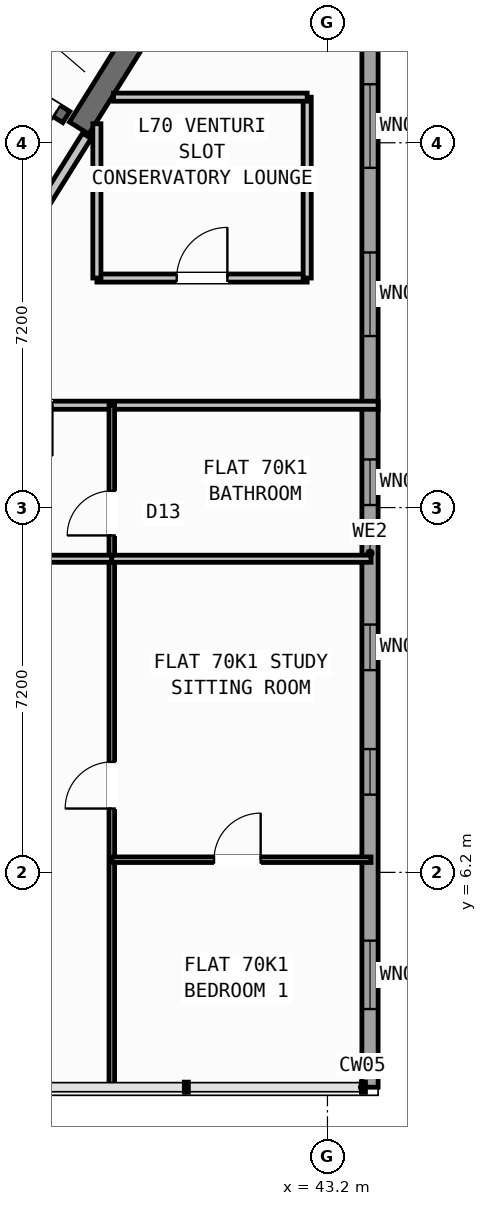
"""IFC4 building model, lengths in metres.
Left out: names, types, materials, properties, quantities, classifications, styles, units other than length and angle.
Written with IfcOpenShell. Run it as: python <this file> out.ifc"""

import sys

from ifc_helpers import new_model, si_unit, direction, frame, frame_2d, origin, place, context, subcontext, project, spatial, rectangle, extrude, source, transform, mapped, element, fill, save


model = new_model("IFC4")
c1 = context("Model", 3, precision=1e-05, world=origin(), true_north=direction((0.0, 1.0)))
c2 = subcontext(c1, "Body", "Model", "MODEL_VIEW")
j1 = project(units=[si_unit("LENGTHUNIT", "METRE"), si_unit("PLANEANGLEUNIT", "RADIAN")], contexts=[c1])
p1 = place(None, origin())
s1 = spatial("IfcSite", under=j1, at=p1, CompositionType="ELEMENT")
p2 = place(p1, origin())
s2 = spatial("IfcBuilding", under=s1, at=p2, CompositionType="ELEMENT")
p3 = place(p2, frame((0.0, 0.0, 277.2)))
s3 = spatial("IfcBuildingStorey", under=s2, at=p3, CompositionType="ELEMENT", Elevation=277.2)
p4 = place(p3, frame((40.221, 23.965, 0.0), z_axis=(0.0, 0.0, 1.0), x_axis=(-0.529902075036, -0.848058836916, 0.0)))
e1 = element("IfcWall", 1, at=p4, inside=s3, PredefinedType="SHEAR", context=c2, shape_type="SweptSolid", body=[
    extrude(rectangle(XDim=3.625, YDim=0.45, at=frame_2d((1.812, 0.0))), origin(), (0.0, 0.0, 1.0), 3.35),
])
p5 = place(p3, frame((44.04, 23.04, 0.0), z_axis=(0.0, 0.0, 1.0), x_axis=(0.0, -1.0, 0.0)))
e2 = element("IfcWall", 2, at=p5, inside=s3, PredefinedType="STANDARD", context=c2, shape_type="SweptSolid", body=[
    extrude(rectangle(XDim=21.08, YDim=0.32, at=frame_2d((10.54, 0.0))), origin(), (0.0, 0.0, 1.0), 3.35),
])
p6 = place(p5, frame((1.285, 0.0, 0.9)))
e3 = element("IfcOpeningElement", 3, at=p6, cuts=e2, PredefinedType="OPENING", context=c2, shape_type="SweptSolid", body=[
    extrude(rectangle(XDim=1.65, YDim=1.45, at=frame_2d((0.825, 0.725))), frame((0.0, 0.17, 0.0), z_axis=(0.0, -1.0, 0.0), x_axis=(1.0, 0.0, 0.0)), (0.0, 0.0, 1.0), 0.34),
])
p7 = place(p5, frame((4.605, 0.0, 0.9)))
e4 = element("IfcOpeningElement", 4, at=p7, cuts=e2, PredefinedType="OPENING", context=c2, shape_type="SweptSolid", body=[
    extrude(rectangle(XDim=1.65, YDim=1.45, at=frame_2d((0.825, 0.725))), frame((0.0, 0.17, 0.0), z_axis=(0.0, -1.0, 0.0), x_axis=(1.0, 0.0, 0.0)), (0.0, 0.0, 1.0), 0.34),
])
p8 = place(p5, frame((8.69, 0.0, 1.0)))
e5 = element("IfcOpeningElement", 5, at=p8, cuts=e2, PredefinedType="OPENING", context=c2, shape_type="SweptSolid", body=[
    extrude(rectangle(XDim=0.9, YDim=1.25, at=frame_2d((0.45, 0.625))), frame((0.0, 0.17, 0.0), z_axis=(0.0, -1.0, 0.0), x_axis=(1.0, 0.0, 0.0)), (0.0, 0.0, 1.0), 0.34),
])
p9 = place(p5, frame((11.949, 0.0, 1.0)))
e6 = element("IfcOpeningElement", 6, at=p9, cuts=e2, PredefinedType="OPENING", context=c2, shape_type="SweptSolid", body=[
    extrude(rectangle(XDim=0.9, YDim=1.25, at=frame_2d((0.45, 0.625))), frame((0.0, 0.17, 0.0), z_axis=(0.0, -1.0, 0.0), x_axis=(1.0, 0.0, 0.0)), (0.0, 0.0, 1.0), 0.34),
])
p10 = place(p5, frame((14.406, 0.0, 1.0)))
e7 = element("IfcOpeningElement", 7, at=p10, cuts=e2, PredefinedType="OPENING", context=c2, shape_type="SweptSolid", body=[
    extrude(rectangle(XDim=0.9, YDim=1.25, at=frame_2d((0.45, 0.625))), frame((0.0, 0.17, 0.0), z_axis=(0.0, -1.0, 0.0), x_axis=(1.0, 0.0, 0.0)), (0.0, 0.0, 1.0), 0.34),
])
p11 = place(p5, frame((18.188, 0.0, 0.9)))
e8 = element("IfcOpeningElement", 8, at=p11, cuts=e2, PredefinedType="OPENING", context=c2, shape_type="SweptSolid", body=[
    extrude(rectangle(XDim=1.35, YDim=1.45, at=frame_2d((0.675, 0.725))), frame((0.0, 0.17, 0.0), z_axis=(0.0, -1.0, 0.0), x_axis=(1.0, 0.0, 0.0)), (0.0, 0.0, 1.0), 0.34),
])
p12 = place(p3, frame((38.046, 21.108, 0.0), z_axis=(0.0, 0.0, 1.0), x_axis=(-0.848054434086, 0.529909121291, 0.0)))
e9 = element("IfcWall", 9, at=p12, inside=s3, PredefinedType="SHEAR", context=c2, shape_type="SweptSolid", body=[
    extrude(rectangle(XDim=7.33, YDim=0.26, at=frame_2d((3.665, 0.0))), origin(), (0.0, 0.0, 1.0), 3.35),
])
p13 = place(p12, frame((0.22, 0.0, 0.0)))
e10 = element("IfcOpeningElement", 10, at=p13, cuts=e9, PredefinedType="OPENING", context=c2, shape_type="SweptSolid", body=[
    extrude(rectangle(XDim=1.1, YDim=2.1, at=frame_2d((0.55, 1.05))), frame((0.0, 0.14, 0.0), z_axis=(0.0, -1.0, 0.0), x_axis=(1.0, 0.0, 0.0)), (0.0, 0.0, 1.0), 0.28),
])
p14 = place(p3, frame((38.451, 20.737, 0.0), z_axis=(0.0, 0.0, 1.0), x_axis=(-0.529924799939, -0.848044637038, 0.0)))
e11 = element("IfcWall", 11, at=p14, inside=s3, PredefinedType="STANDARD", context=c2, shape_type="SweptSolid", body=[
    extrude(rectangle(XDim=2.96, YDim=0.2, at=frame_2d((1.48, 0.0))), origin(), (0.0, 0.0, 1.0), 3.34),
])
p15 = place(p14, frame((1.46, 0.0, 0.0)))
e12 = element("IfcOpeningElement", 12, at=p15, cuts=e11, PredefinedType="OPENING", context=c2, shape_type="SweptSolid", body=[
    extrude(rectangle(XDim=0.86, YDim=2.05, at=frame_2d((0.43, 1.025))), frame((0.0, 0.11, 0.0), z_axis=(0.0, -1.0, 0.0), x_axis=(1.0, 0.0, 0.0)), (0.0, 0.0, 1.0), 0.22),
])
p16 = place(p3, frame((35.178, 15.42, 0.0), z_axis=(0.0, 0.0, 1.0), x_axis=(1.0, 0.0, 0.0)))
e13 = element("IfcWall", 13, at=p16, inside=s3, PredefinedType="PARTITIONING", context=c2, shape_type="SweptSolid", body=[
    extrude(rectangle(XDim=9.021, YDim=0.16, at=frame_2d((4.511, 0.0))), origin(), (0.0, 0.0, 1.0), 3.34),
])
p17 = place(p16, frame((1.594, 0.0, 0.0)))
e14 = element("IfcOpeningElement", 14, at=p17, cuts=e13, PredefinedType="OPENING", context=c2, shape_type="SweptSolid", body=[
    extrude(rectangle(XDim=1.0, YDim=2.1, at=frame_2d((0.5, 1.05))), frame((0.0, 0.09, 0.0), z_axis=(0.0, -1.0, 0.0), x_axis=(1.0, 0.0, 0.0)), (0.0, 0.0, 1.0), 0.18),
])
p18 = place(p3, frame((38.65, 17.93, 0.0), z_axis=(0.0, 0.0, 1.0), x_axis=(1.0, 0.0, 0.0)))
e15 = element("IfcWall", 15, at=p18, inside=s3, PredefinedType="PARTITIONING", context=c2, shape_type="SweptSolid", body=[
    extrude(rectangle(XDim=4.15, YDim=0.16, at=frame_2d((2.075, 0.0))), origin(), (0.0, 0.0, 1.0), 3.34),
])
p19 = place(p18, frame((1.575, 0.0, 0.0)))
e16 = element("IfcOpeningElement", 16, at=p19, cuts=e15, PredefinedType="OPENING", context=c2, shape_type="SweptSolid", body=[
    extrude(rectangle(XDim=1.0, YDim=2.1, at=frame_2d((0.5, 1.05))), frame((0.0, 0.09, 0.0), z_axis=(0.0, -1.0, 0.0), x_axis=(1.0, 0.0, 0.0)), (0.0, 0.0, 1.0), 0.18),
])
p20 = place(p3, frame((38.65, 17.93, 0.0), z_axis=(0.0, 0.0, 1.0), x_axis=(0.0, 1.0, 0.0)))
e17 = element("IfcWall", 17, at=p20, inside=s3, PredefinedType="PARTITIONING", context=c2, shape_type="SweptSolid", body=[
    extrude(rectangle(XDim=3.046, YDim=0.16, at=frame_2d((1.523, 0.0))), origin(), (0.0, 0.0, 1.0), 3.34),
])
p21 = place(p3, frame((42.8, 17.93, 0.0), z_axis=(0.0, 0.0, 1.0), x_axis=(0.0, 1.0, 0.0)))
e18 = element("IfcWall", 18, at=p21, inside=s3, PredefinedType="PARTITIONING", context=c2, shape_type="SweptSolid", body=[
    extrude(rectangle(XDim=3.57, YDim=0.16, at=frame_2d((1.785, 0.0))), origin(), (0.0, 0.0, 1.0), 3.34),
])
p22 = place(p3, frame((38.978, 21.5, 0.0), z_axis=(0.0, 0.0, 1.0), x_axis=(1.0, 0.0, 0.0)))
e19 = element("IfcWall", 19, at=p22, inside=s3, PredefinedType="PARTITIONING", context=c2, shape_type="SweptSolid", body=[
    extrude(rectangle(XDim=3.823, YDim=0.16, at=frame_2d((1.911, 0.0))), origin(), (0.0, 0.0, 1.0), 3.34),
])
p23 = place(p3, frame((38.944, 1.96, 0.0), z_axis=(0.0, 0.0, 1.0), x_axis=(0.0, 1.0, 0.0)))
e20 = element("IfcWall", 20, at=p23, inside=s3, PredefinedType="PARTITIONING", context=c2, shape_type="SweptSolid", body=[
    extrude(rectangle(XDim=13.46, YDim=0.11, at=frame_2d((6.73, 0.0))), origin(), (0.0, 0.0, 1.0), 3.34),
])
p24 = place(p23, frame((5.5, 0.0, 0.0)))
e21 = element("IfcOpeningElement", 21, at=p24, cuts=e20, PredefinedType="OPENING", context=c2, shape_type="SweptSolid", body=[
    extrude(rectangle(XDim=0.92, YDim=2.08, at=frame_2d((0.46, 1.04))), frame((0.0, 0.065, 0.0), z_axis=(0.0, -1.0, 0.0), x_axis=(1.0, 0.0, 0.0)), (0.0, 0.0, 1.0), 0.13),
])
p25 = place(p23, frame((10.89, 0.0, 0.0)))
e22 = element("IfcOpeningElement", 22, at=p25, cuts=e20, PredefinedType="OPENING", context=c2, shape_type="SweptSolid", body=[
    extrude(rectangle(XDim=0.88, YDim=2.08, at=frame_2d((0.44, 1.04))), frame((0.0, 0.065, 0.0), z_axis=(0.0, -1.0, 0.0), x_axis=(1.0, 0.0, 0.0)), (0.0, 0.0, 1.0), 0.13),
])
p26 = place(p3, frame((33.267, 12.39, 0.0), z_axis=(0.0, 0.0, 1.0), x_axis=(1.0, 0.0, 0.0)))
e23 = element("IfcWall", 23, at=p26, inside=s3, PredefinedType="PLUMBINGWALL", context=c2, shape_type="SweptSolid", body=[
    extrude(rectangle(XDim=5.677, YDim=0.14, at=frame_2d((2.838, 0.0))), origin(), (0.0, 0.0, 1.0), 3.34),
])
p27 = place(p26, frame((1.795, 0.0, 0.0)))
e24 = element("IfcOpeningElement", 24, at=p27, cuts=e23, PredefinedType="OPENING", context=c2, shape_type="SweptSolid", body=[
    extrude(rectangle(XDim=0.92, YDim=2.08, at=frame_2d((0.46, 1.04))), frame((0.0, 0.08, 0.0), z_axis=(0.0, -1.0, 0.0), x_axis=(1.0, 0.0, 0.0)), (0.0, 0.0, 1.0), 0.16),
])
p28 = place(p3, frame((38.944, 12.39, 0.0), z_axis=(0.0, 0.0, 1.0), x_axis=(1.0, 0.0, 0.0)))
e25 = element("IfcWall", 25, at=p28, inside=s3, PredefinedType="PLUMBINGWALL", context=c2, shape_type="SweptSolid", body=[
    extrude(rectangle(XDim=5.116, YDim=0.14, at=frame_2d((2.558, 0.0))), origin(), (0.0, 0.0, 1.0), 3.34),
])
p29 = place(p3, frame((38.944, 6.45, 0.0), z_axis=(0.0, 0.0, 1.0), x_axis=(1.0, 0.0, 0.0)))
e26 = element("IfcWall", 26, at=p29, inside=s3, PredefinedType="PARTITIONING", context=c2, shape_type="SweptSolid", body=[
    extrude(rectangle(XDim=5.116, YDim=0.11, at=frame_2d((2.558, 0.0))), origin(), (0.0, 0.0, 1.0), 3.34),
])
p30 = place(p29, frame((2.018, 0.0, 0.0)))
e27 = element("IfcOpeningElement", 27, at=p30, cuts=e26, PredefinedType="OPENING", context=c2, shape_type="SweptSolid", body=[
    extrude(rectangle(XDim=0.92, YDim=2.08, at=frame_2d((0.46, 1.04))), frame((0.0, 0.065, 0.0), z_axis=(0.0, -1.0, 0.0), x_axis=(1.0, 0.0, 0.0)), (0.0, 0.0, 1.0), 0.13),
])
m1 = source(origin(), c2, "Body", "SweptSolid", [
    extrude(rectangle(XDim=1.65, YDim=1.45, at=frame_2d((0.825, 0.725))), frame((0.0, 0.03, 0.0), z_axis=(0.0, -1.0, 0.0), x_axis=(1.0, 0.0, 0.0)), (0.0, 0.0, 1.0), 0.06),
])
p31 = place(p6, origin())
e28 = element("IfcWindow", 28, at=p31, inside=s3, PartitioningType="SINGLE_PANEL", PredefinedType="WINDOW", context=c2, shape_type="MappedRepresentation", body=[
    mapped(m1, transform((0.0, 0.0, 0.0), scale=1.0)),
])
fill(e3, e28)
p32 = place(p7, origin())
e29 = element("IfcWindow", 29, at=p32, inside=s3, PartitioningType="SINGLE_PANEL", PredefinedType="WINDOW", context=c2, shape_type="MappedRepresentation", body=[
    mapped(m1, transform((0.0, 0.0, 0.0), scale=1.0)),
])
fill(e4, e29)
m2 = source(origin(), c2, "Body", "SweptSolid", [
    extrude(rectangle(XDim=0.9, YDim=1.25, at=frame_2d((0.45, 0.625))), frame((0.0, 0.03, 0.0), z_axis=(0.0, -1.0, 0.0), x_axis=(1.0, 0.0, 0.0)), (0.0, 0.0, 1.0), 0.06),
])
p33 = place(p8, origin())
e30 = element("IfcWindow", 30, at=p33, inside=s3, PartitioningType="SINGLE_PANEL", PredefinedType="WINDOW", context=c2, shape_type="MappedRepresentation", body=[
    mapped(m2, transform((0.0, 0.0, 0.0), scale=1.0)),
])
fill(e5, e30)
p34 = place(p9, origin())
e31 = element("IfcWindow", 31, at=p34, inside=s3, PartitioningType="SINGLE_PANEL", PredefinedType="WINDOW", context=c2, shape_type="MappedRepresentation", body=[
    mapped(m2, transform((0.0, 0.0, 0.0), scale=1.0)),
])
fill(e6, e31)
p35 = place(p10, origin())
e32 = element("IfcWindow", 32, at=p35, inside=s3, PartitioningType="SINGLE_PANEL", PredefinedType="WINDOW", context=c2, shape_type="MappedRepresentation", body=[
    mapped(m2, transform((0.0, 0.0, 0.0), scale=1.0)),
])
fill(e7, e32)
m3 = source(origin(), c2, "Body", "SweptSolid", [
    extrude(rectangle(XDim=1.35, YDim=1.45, at=frame_2d((0.675, 0.725))), frame((0.0, 0.03, 0.0), z_axis=(0.0, -1.0, 0.0), x_axis=(1.0, 0.0, 0.0)), (0.0, 0.0, 1.0), 0.06),
])
p36 = place(p11, origin())
e33 = element("IfcWindow", 33, at=p36, inside=s3, PartitioningType="SINGLE_PANEL", PredefinedType="WINDOW", context=c2, shape_type="MappedRepresentation", body=[
    mapped(m3, transform((0.0, 0.0, 0.0), scale=1.0)),
])
fill(e8, e33)
m4 = source(origin(), c2, "Body", "SweptSolid", [
    extrude(rectangle(XDim=1.1, YDim=2.1, at=frame_2d((0.55, 1.05))), frame((0.0, 0.025, 0.0), z_axis=(0.0, -1.0, 0.0), x_axis=(1.0, 0.0, 0.0)), (0.0, 0.0, 1.0), 0.05),
])
p37 = place(p13, origin())
e34 = element("IfcDoor", 34, at=p37, inside=s3, OperationType="SINGLE_SWING_LEFT", PredefinedType="DOOR", context=c2, shape_type="MappedRepresentation", body=[
    mapped(m4, transform((0.0, 0.0, 0.0), scale=1.0)),
])
fill(e10, e34)
m5 = source(origin(), c2, "Body", "SweptSolid", [
    extrude(rectangle(XDim=1.0, YDim=2.1, at=frame_2d((0.5, 1.05))), frame((0.0, 0.025, 0.0), z_axis=(0.0, -1.0, 0.0), x_axis=(1.0, 0.0, 0.0)), (0.0, 0.0, 1.0), 0.05),
])
p38 = place(p19, origin())
e35 = element("IfcDoor", 35, at=p38, inside=s3, OperationType="SINGLE_SWING_RIGHT", PredefinedType="DOOR", context=c2, shape_type="MappedRepresentation", body=[
    mapped(m5, transform((0.0, 0.0, 0.0), scale=1.0)),
])
fill(e16, e35)
m6 = source(origin(), c2, "Body", "SweptSolid", [
    extrude(rectangle(XDim=0.92, YDim=2.08, at=frame_2d((0.46, 1.04))), frame((0.0, 0.025, 0.0), z_axis=(0.0, -1.0, 0.0), x_axis=(1.0, 0.0, 0.0)), (0.0, 0.0, 1.0), 0.05),
])
p39 = place(p24, origin())
e36 = element("IfcDoor", 36, at=p39, inside=s3, OperationType="SINGLE_SWING_LEFT", PredefinedType="DOOR", context=c2, shape_type="MappedRepresentation", body=[
    mapped(m6, transform((0.0, 0.0, 0.0), scale=1.0)),
])
fill(e21, e36)
p40 = place(p30, origin())
e37 = element("IfcDoor", 37, at=p40, inside=s3, OperationType="SINGLE_SWING_RIGHT", PredefinedType="DOOR", context=c2, shape_type="MappedRepresentation", body=[
    mapped(m6, transform((0.0, 0.0, 0.0), scale=1.0)),
])
fill(e27, e37)
p41 = place(p17, frame((1.0, 0.0, 0.0), z_axis=(0.0, 0.0, 1.0), x_axis=(-1.0, 0.0, 0.0)))
e38 = element("IfcDoor", 38, at=p41, inside=s3, OperationType="SINGLE_SWING_LEFT", PredefinedType="DOOR", context=c2, shape_type="MappedRepresentation", body=[
    mapped(m5, transform((0.0, 0.0, 0.0), scale=1.0)),
])
fill(e14, e38)
m7 = source(origin(), c2, "Body", "SweptSolid", [
    extrude(rectangle(XDim=0.88, YDim=2.08, at=frame_2d((0.44, 1.04))), frame((0.0, 0.025, 0.0), z_axis=(0.0, -1.0, 0.0), x_axis=(1.0, 0.0, 0.0)), (0.0, 0.0, 1.0), 0.05),
])
p42 = place(p25, origin())
e39 = element("IfcDoor", 39, at=p42, inside=s3, OperationType="SINGLE_SWING_LEFT", PredefinedType="DOOR", context=c2, shape_type="MappedRepresentation", body=[
    mapped(m7, transform((0.0, 0.0, 0.0), scale=1.0)),
])
fill(e22, e39)
save(model, sys.argv[1])
